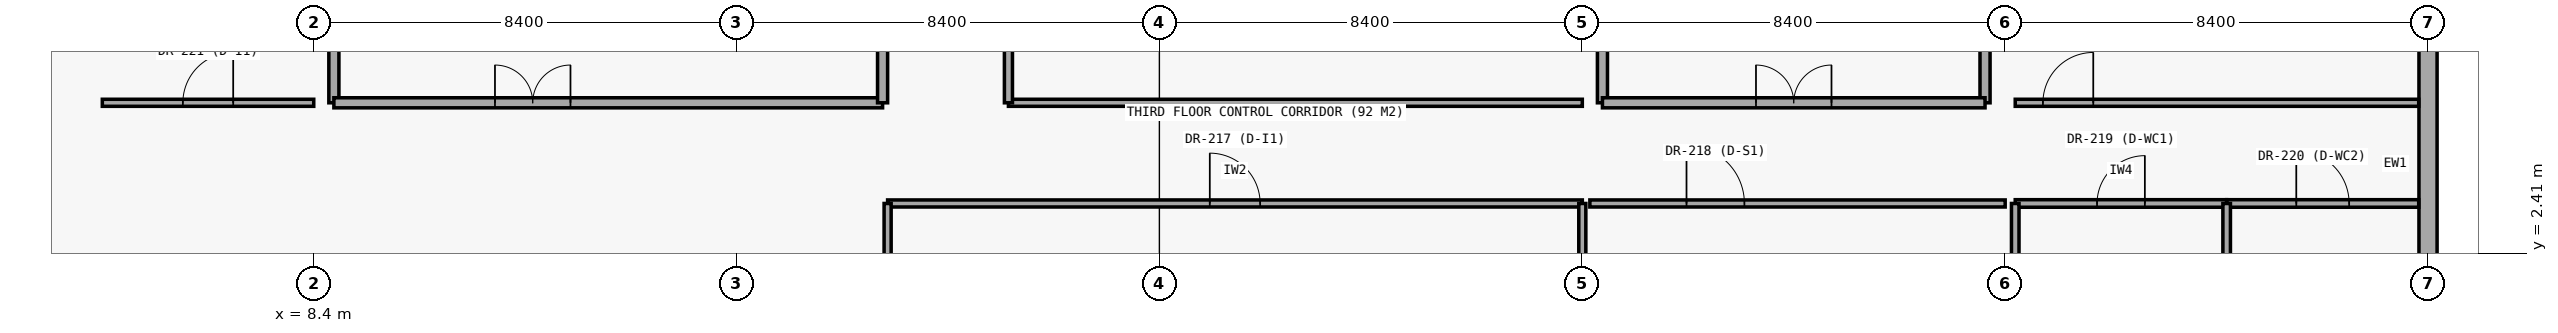
"""IFC4 building model, lengths in metres.
Left out: names, types, materials, properties, quantities, classifications, styles, units other than length and angle.
Written with IfcOpenShell. Run it as: python <this file> out.ifc"""

import sys

from ifc_helpers import new_model, si_unit, direction, frame, frame_2d, origin, place, context, subcontext, project, spatial, rectangle, extrude, element, fill, save


model = new_model("IFC4")
c1 = context("Model", 3, precision=1e-05, world=origin(), true_north=direction((0.0, 1.0)))
c2 = subcontext(c1, "Body", "Model", "MODEL_VIEW")
j1 = project(units=[si_unit("LENGTHUNIT", "METRE"), si_unit("PLANEANGLEUNIT", "RADIAN")], contexts=[c1])
p1 = place(None, origin())
s1 = spatial("IfcSite", under=j1, at=p1, CompositionType="ELEMENT")
p2 = place(p1, origin())
s2 = spatial("IfcBuilding", under=s1, at=p2, CompositionType="ELEMENT")
p3 = place(p2, frame((0.0, 0.0, 13.2)))
s3 = spatial("IfcBuildingStorey", under=s2, at=p3, CompositionType="ELEMENT", Elevation=13.2)
p4 = place(p3, frame((50.4, 0.0, 0.0), z_axis=(0.0, 0.0, 1.0), x_axis=(0.0, 1.0, 0.0)))
e1 = element("IfcWall", 1, at=p4, inside=s3, PredefinedType="STANDARD", context=c2, shape_type="SweptSolid", body=[
    extrude(rectangle(XDim=8.4, YDim=0.36, at=frame_2d((4.2, 0.0))), origin(), (0.0, 0.0, 1.0), 3.62),
])
p5 = place(p3, frame((0.0, 4.2, 0.0), z_axis=(0.0, 0.0, 1.0), x_axis=(0.707106781187, -0.707106781187, 0.0)))
e2 = element("IfcWall", 2, at=p5, inside=s3, PredefinedType="STANDARD", context=c2, shape_type="SweptSolid", body=[
    extrude(rectangle(XDim=5.94, YDim=0.36, at=frame_2d((2.97, 0.0))), origin(), (0.0, 0.0, 1.0), 3.62),
])
p6 = place(p5, frame((2.5, 0.0, 1.0)))
e3 = element("IfcOpeningElement", 3, at=p6, cuts=e2, PredefinedType="OPENING", context=c2, shape_type="SweptSolid", body=[
    extrude(rectangle(XDim=0.75, YDim=1.5, at=frame_2d((0.375, 0.75))), frame((0.0, 0.19, 0.0), z_axis=(0.0, -1.0, 0.0), x_axis=(1.0, 0.0, 0.0)), (0.0, 0.0, 1.0), 0.38),
])
p7 = place(p3, frame((8.8, 5.4, 0.0), z_axis=(0.0, 0.0, 1.0), x_axis=(0.0, 1.0, 0.0)))
e4 = element("IfcWall", 4, at=p7, inside=s3, PredefinedType="PARTITIONING", context=c2, shape_type="SweptSolid", body=[
    extrude(rectangle(XDim=2.85, YDim=0.2, at=frame_2d((1.425, 0.0))), origin(), (0.0, 0.0, 1.0), 3.52),
])
p8 = place(p3, frame((8.8, 5.4, 0.0), z_axis=(0.0, 0.0, 1.0), x_axis=(1.0, 0.0, 0.0)))
e5 = element("IfcWall", 5, at=p8, inside=s3, PredefinedType="PARTITIONING", context=c2, shape_type="SweptSolid", body=[
    extrude(rectangle(XDim=10.9, YDim=0.2, at=frame_2d((5.45, 0.0))), origin(), (0.0, 0.0, 1.0), 3.52),
])
p9 = place(p8, frame((3.2, 0.0, 0.0)))
e6 = element("IfcOpeningElement", 6, at=p9, cuts=e5, PredefinedType="OPENING", context=c2, shape_type="SweptSolid", body=[
    extrude(rectangle(XDim=1.5, YDim=2.2, at=frame_2d((0.75, 1.1))), frame((0.0, 0.11, 0.0), z_axis=(0.0, -1.0, 0.0), x_axis=(1.0, 0.0, 0.0)), (0.0, 0.0, 1.0), 0.22),
])
p10 = place(p3, frame((19.7, 5.4, 0.0), z_axis=(0.0, 0.0, 1.0), x_axis=(0.0, 1.0, 0.0)))
e7 = element("IfcWall", 7, at=p10, inside=s3, PredefinedType="PARTITIONING", context=c2, shape_type="SweptSolid", body=[
    extrude(rectangle(XDim=9.6, YDim=0.2, at=frame_2d((4.8, 0.0))), origin(), (0.0, 0.0, 1.0), 3.52),
])
for number, where, z_axis, x_axis in (
    (8, (34.0, 5.4, 0.0), (0.0, 0.0, 1.0), (0.0, 1.0, 0.0)),
    (9, (41.6, 5.4, 0.0), (0.0, 0.0, 1.0), (0.0, 1.0, 0.0)),
):
    element("IfcWall", number, at=place(p3, frame(where, z_axis=z_axis, x_axis=x_axis)), inside=s3, PredefinedType="PARTITIONING", context=c2, shape_type="SweptSolid", body=[
        extrude(rectangle(XDim=2.85, YDim=0.2, at=frame_2d((1.425, 0.0))), origin(), (0.0, 0.0, 1.0), 3.49),
    ])
p11 = place(p3, frame((34.0, 5.4, 0.0), z_axis=(0.0, 0.0, 1.0), x_axis=(1.0, 0.0, 0.0)))
e10 = element("IfcWall", 10, at=p11, inside=s3, PredefinedType="PARTITIONING", context=c2, shape_type="SweptSolid", body=[
    extrude(rectangle(XDim=7.6, YDim=0.2, at=frame_2d((3.8, 0.0))), origin(), (0.0, 0.0, 1.0), 3.52),
])
p12 = place(p11, frame((3.05, 0.0, 0.0)))
e11 = element("IfcOpeningElement", 11, at=p12, cuts=e10, PredefinedType="OPENING", context=c2, shape_type="SweptSolid", body=[
    extrude(rectangle(XDim=1.5, YDim=2.2, at=frame_2d((0.75, 1.1))), frame((0.0, 0.11, 0.0), z_axis=(0.0, -1.0, 0.0), x_axis=(1.0, 0.0, 0.0)), (0.0, 0.0, 1.0), 0.22),
])
p13 = place(p3, frame((19.8, 3.4, 0.0), z_axis=(0.0, 0.0, 1.0), x_axis=(1.0, 0.0, 0.0)))
e12 = element("IfcWall", 12, at=p13, inside=s3, PredefinedType="PARTITIONING", context=c2, shape_type="SweptSolid", body=[
    extrude(rectangle(XDim=13.8, YDim=0.14, at=frame_2d((6.9, 0.0))), origin(), (0.0, 0.0, 1.0), 3.5),
])
p14 = place(p13, frame((6.4, 0.0, 0.0)))
e13 = element("IfcOpeningElement", 13, at=p14, cuts=e12, PredefinedType="OPENING", context=c2, shape_type="SweptSolid", body=[
    extrude(rectangle(XDim=1.0, YDim=2.15, at=frame_2d((0.5, 1.075))), frame((0.0, 0.08, 0.0), z_axis=(0.0, -1.0, 0.0), x_axis=(1.0, 0.0, 0.0)), (0.0, 0.0, 1.0), 0.16),
])
p15 = place(p3, frame((33.75, 3.4, 0.0), z_axis=(0.0, 0.0, 1.0), x_axis=(1.0, 0.0, 0.0)))
e14 = element("IfcWall", 14, at=p15, inside=s3, PredefinedType="PARTITIONING", context=c2, shape_type="SweptSolid", body=[
    extrude(rectangle(XDim=8.25, YDim=0.14, at=frame_2d((4.125, 0.0))), origin(), (0.0, 0.0, 1.0), 3.5),
])
p16 = place(p15, frame((1.92, 0.0, 0.0)))
e15 = element("IfcOpeningElement", 15, at=p16, cuts=e14, PredefinedType="OPENING", context=c2, shape_type="SweptSolid", body=[
    extrude(rectangle(XDim=1.15, YDim=2.15, at=frame_2d((0.575, 1.075))), frame((0.0, 0.08, 0.0), z_axis=(0.0, -1.0, 0.0), x_axis=(1.0, 0.0, 0.0)), (0.0, 0.0, 1.0), 0.16),
])
p17 = place(p3, frame((42.2, 3.4, 0.0), z_axis=(0.0, 0.0, 1.0), x_axis=(1.0, 0.0, 0.0)))
e16 = element("IfcWall", 16, at=p17, inside=s3, PredefinedType="PARTITIONING", context=c2, shape_type="SweptSolid", body=[
    extrude(rectangle(XDim=4.2, YDim=0.15, at=frame_2d((2.1, 0.0))), origin(), (0.0, 0.0, 1.0), 3.5),
])
p18 = place(p17, frame((1.625, 0.0, 0.0)))
e17 = element("IfcOpeningElement", 17, at=p18, cuts=e16, PredefinedType="OPENING", context=c2, shape_type="SweptSolid", body=[
    extrude(rectangle(XDim=0.95, YDim=2.1, at=frame_2d((0.475, 1.05))), frame((0.0, 0.085, 0.0), z_axis=(0.0, -1.0, 0.0), x_axis=(1.0, 0.0, 0.0)), (0.0, 0.0, 1.0), 0.17),
])
p19 = place(p3, frame((46.4, 3.4, 0.0), z_axis=(0.0, 0.0, 1.0), x_axis=(1.0, 0.0, 0.0)))
e18 = element("IfcWall", 18, at=p19, inside=s3, PredefinedType="PARTITIONING", context=c2, shape_type="SweptSolid", body=[
    extrude(rectangle(XDim=3.815, YDim=0.15, at=frame_2d((1.908, 0.0))), origin(), (0.0, 0.0, 1.0), 3.5),
])
p20 = place(p19, frame((1.383, 0.0, 0.0)))
e19 = element("IfcOpeningElement", 19, at=p20, cuts=e18, PredefinedType="OPENING", context=c2, shape_type="SweptSolid", body=[
    extrude(rectangle(XDim=1.05, YDim=2.15, at=frame_2d((0.525, 1.075))), frame((0.0, 0.085, 0.0), z_axis=(0.0, -1.0, 0.0), x_axis=(1.0, 0.0, 0.0)), (0.0, 0.0, 1.0), 0.17),
])
p21 = place(p3, frame((4.2, 5.4, 0.0), z_axis=(0.0, 0.0, 1.0), x_axis=(1.0, 0.0, 0.0)))
e20 = element("IfcWall", 20, at=p21, inside=s3, PredefinedType="PARTITIONING", context=c2, shape_type="SweptSolid", body=[
    extrude(rectangle(XDim=4.2, YDim=0.14, at=frame_2d((2.1, 0.0))), origin(), (0.0, 0.0, 1.0), 3.5),
])
p22 = place(p21, frame((1.6, 0.0, 0.0)))
e21 = element("IfcOpeningElement", 21, at=p22, cuts=e20, PredefinedType="OPENING", context=c2, shape_type="SweptSolid", body=[
    extrude(rectangle(XDim=1.0, YDim=2.15, at=frame_2d((0.5, 1.075))), frame((0.0, 0.08, 0.0), z_axis=(0.0, -1.0, 0.0), x_axis=(1.0, 0.0, 0.0)), (0.0, 0.0, 1.0), 0.16),
])
p23 = place(p3, frame((22.2, 5.4, 0.0), z_axis=(0.0, 0.0, 1.0), x_axis=(1.0, 0.0, 0.0)))
e22 = element("IfcWall", 22, at=p23, inside=s3, PredefinedType="PARTITIONING", context=c2, shape_type="SweptSolid", body=[
    extrude(rectangle(XDim=11.4, YDim=0.14, at=frame_2d((5.7, 0.0))), origin(), (0.0, 0.0, 1.0), 3.5),
])
p24 = place(p3, frame((42.2, 5.4, 0.0), z_axis=(0.0, 0.0, 1.0), x_axis=(1.0, 0.0, 0.0)))
e23 = element("IfcWall", 23, at=p24, inside=s3, PredefinedType="PARTITIONING", context=c2, shape_type="SweptSolid", body=[
    extrude(rectangle(XDim=8.015, YDim=0.14, at=frame_2d((4.008, 0.0))), origin(), (0.0, 0.0, 1.0), 3.5),
])
p25 = place(p24, frame((0.55, 0.0, 0.0)))
e24 = element("IfcOpeningElement", 24, at=p25, cuts=e23, PredefinedType="OPENING", context=c2, shape_type="SweptSolid", body=[
    extrude(rectangle(XDim=1.0, YDim=2.15, at=frame_2d((0.5, 1.075))), frame((0.0, 0.08, 0.0), z_axis=(0.0, -1.0, 0.0), x_axis=(1.0, 0.0, 0.0)), (0.0, 0.0, 1.0), 0.16),
])
p26 = place(p3, frame((19.8, 0.045, 0.0), z_axis=(0.0, 0.0, 1.0), x_axis=(0.0, 1.0, 0.0)))
e25 = element("IfcWall", 25, at=p26, inside=s3, PredefinedType="PARTITIONING", context=c2, shape_type="SweptSolid", body=[
    extrude(rectangle(XDim=3.355, YDim=0.14, at=frame_2d((1.677, 0.0))), origin(), (0.0, 0.0, 1.0), 3.5),
])
p27 = place(p3, frame((22.2, 5.4, 0.0), z_axis=(0.0, 0.0, 1.0), x_axis=(0.0, 1.0, 0.0)))
e26 = element("IfcWall", 26, at=p27, inside=s3, PredefinedType="PARTITIONING", context=c2, shape_type="SweptSolid", body=[
    extrude(rectangle(XDim=16.6, YDim=0.16, at=frame_2d((8.3, 0.0))), origin(), (0.0, 0.0, 1.0), 3.5),
])
p28 = place(p27, frame((4.72, 0.0, 0.0)))
e27 = element("IfcOpeningElement", 27, at=p28, cuts=e26, PredefinedType="OPENING", context=c2, shape_type="SweptSolid", body=[
    extrude(rectangle(XDim=1.0, YDim=2.15, at=frame_2d((0.5, 1.075))), frame((0.0, 0.09, 0.0), z_axis=(0.0, -1.0, 0.0), x_axis=(1.0, 0.0, 0.0)), (0.0, 0.0, 1.0), 0.18),
])
p29 = place(p3, frame((33.6, 0.145, 0.0), z_axis=(0.0, 0.0, 1.0), x_axis=(0.0, 1.0, 0.0)))
e28 = element("IfcWall", 28, at=p29, inside=s3, PredefinedType="PARTITIONING", context=c2, shape_type="SweptSolid", body=[
    extrude(rectangle(XDim=3.255, YDim=0.14, at=frame_2d((1.627, 0.0))), origin(), (0.0, 0.0, 1.0), 3.49),
])
p30 = place(p3, frame((42.2, 0.145, 0.0), z_axis=(0.0, 0.0, 1.0), x_axis=(0.0, 1.0, 0.0)))
e29 = element("IfcWall", 29, at=p30, inside=s3, PredefinedType="PARTITIONING", context=c2, shape_type="SweptSolid", body=[
    extrude(rectangle(XDim=3.255, YDim=0.15, at=frame_2d((1.627, 0.0))), origin(), (0.0, 0.0, 1.0), 3.49),
])
p31 = place(p3, frame((46.4, 0.145, 0.0), z_axis=(0.0, 0.0, 1.0), x_axis=(0.0, 1.0, 0.0)))
e30 = element("IfcWall", 30, at=p31, inside=s3, PredefinedType="PARTITIONING", context=c2, shape_type="SweptSolid", body=[
    extrude(rectangle(XDim=3.255, YDim=0.15, at=frame_2d((1.627, 0.0))), origin(), (0.0, 0.0, 1.0), 3.5),
])
p32 = place(p9, origin())
e31 = element("IfcDoor", 31, at=p32, inside=s3, OperationType="DOUBLE_DOOR_SINGLE_SWING", PredefinedType="DOOR", context=c2, shape_type="SweptSolid", body=[
    extrude(rectangle(XDim=1.5, YDim=2.2, at=frame_2d((0.75, 1.1))), frame((0.0, 0.025, 0.0), z_axis=(0.0, -1.0, 0.0), x_axis=(1.0, 0.0, 0.0)), (0.0, 0.0, 1.0), 0.05),
])
fill(e6, e31)
p33 = place(p12, origin())
e32 = element("IfcDoor", 32, at=p33, inside=s3, OperationType="DOUBLE_DOOR_SINGLE_SWING", PredefinedType="DOOR", context=c2, shape_type="SweptSolid", body=[
    extrude(rectangle(XDim=1.5, YDim=2.2, at=frame_2d((0.75, 1.1))), frame((0.0, 0.025, 0.0), z_axis=(0.0, -1.0, 0.0), x_axis=(1.0, 0.0, 0.0)), (0.0, 0.0, 1.0), 0.05),
])
fill(e11, e32)
p34 = place(p14, origin())
e33 = element("IfcDoor", 33, at=p34, inside=s3, OperationType="SINGLE_SWING_LEFT", PredefinedType="DOOR", context=c2, shape_type="SweptSolid", body=[
    extrude(rectangle(XDim=1.0, YDim=2.15, at=frame_2d((0.5, 1.075))), frame((0.0, 0.025, 0.0), z_axis=(0.0, -1.0, 0.0), x_axis=(1.0, 0.0, 0.0)), (0.0, 0.0, 1.0), 0.05),
])
fill(e13, e33)
p35 = place(p16, origin())
e34 = element("IfcDoor", 34, at=p35, inside=s3, OperationType="SINGLE_SWING_LEFT", PredefinedType="DOOR", context=c2, shape_type="SweptSolid", body=[
    extrude(rectangle(XDim=1.15, YDim=2.15, at=frame_2d((0.575, 1.075))), frame((0.0, 0.025, 0.0), z_axis=(0.0, -1.0, 0.0), x_axis=(1.0, 0.0, 0.0)), (0.0, 0.0, 1.0), 0.05),
])
fill(e15, e34)
p36 = place(p18, origin())
e35 = element("IfcDoor", 35, at=p36, inside=s3, OperationType="SINGLE_SWING_RIGHT", PredefinedType="DOOR", context=c2, shape_type="SweptSolid", body=[
    extrude(rectangle(XDim=0.95, YDim=2.1, at=frame_2d((0.475, 1.05))), frame((0.0, 0.025, 0.0), z_axis=(0.0, -1.0, 0.0), x_axis=(1.0, 0.0, 0.0)), (0.0, 0.0, 1.0), 0.05),
])
fill(e17, e35)
p37 = place(p20, origin())
e36 = element("IfcDoor", 36, at=p37, inside=s3, OperationType="SINGLE_SWING_LEFT", PredefinedType="DOOR", context=c2, shape_type="SweptSolid", body=[
    extrude(rectangle(XDim=1.05, YDim=2.15, at=frame_2d((0.525, 1.075))), frame((0.0, 0.025, 0.0), z_axis=(0.0, -1.0, 0.0), x_axis=(1.0, 0.0, 0.0)), (0.0, 0.0, 1.0), 0.05),
])
fill(e19, e36)
p38 = place(p22, origin())
e37 = element("IfcDoor", 37, at=p38, inside=s3, OperationType="SINGLE_SWING_RIGHT", PredefinedType="DOOR", context=c2, shape_type="SweptSolid", body=[
    extrude(rectangle(XDim=1.0, YDim=2.15, at=frame_2d((0.5, 1.075))), frame((0.0, 0.025, 0.0), z_axis=(0.0, -1.0, 0.0), x_axis=(1.0, 0.0, 0.0)), (0.0, 0.0, 1.0), 0.05),
])
fill(e21, e37)
p39 = place(p25, origin())
e38 = element("IfcDoor", 38, at=p39, inside=s3, OperationType="SINGLE_SWING_RIGHT", PredefinedType="DOOR", context=c2, shape_type="SweptSolid", body=[
    extrude(rectangle(XDim=1.0, YDim=2.15, at=frame_2d((0.5, 1.075))), frame((0.0, 0.025, 0.0), z_axis=(0.0, -1.0, 0.0), x_axis=(1.0, 0.0, 0.0)), (0.0, 0.0, 1.0), 0.05),
])
fill(e24, e38)
save(model, sys.argv[1])
